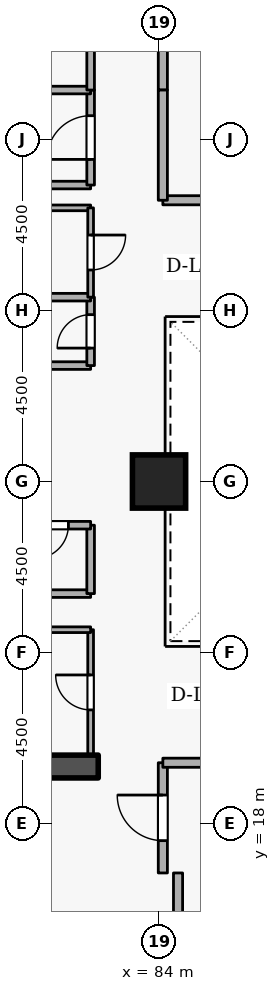
"""IFC4 building model, lengths in metres.
Left out: names, types, materials, properties, quantities, classifications, styles, units other than length and angle.
Written with IfcOpenShell. Run it as: python <this file> out.ifc"""

import sys

from ifc_helpers import new_model, si_unit, direction, frame, frame_2d, origin, origin_2d, place, context, subcontext, project, spatial, rectangle, extrude, element, fill, save


model = new_model("IFC4")
c1 = context("Model", 3, precision=1e-05, world=origin(), true_north=direction((0.0, 1.0)))
c2 = subcontext(c1, "Body", "Model", "MODEL_VIEW")
j1 = project(units=[si_unit("LENGTHUNIT", "METRE"), si_unit("PLANEANGLEUNIT", "RADIAN")], contexts=[c1])
p1 = place(None, origin())
s1 = spatial("IfcSite", under=j1, at=p1, CompositionType="ELEMENT")
p2 = place(p1, origin())
s2 = spatial("IfcBuilding", under=s1, at=p2, CompositionType="ELEMENT")
p3 = place(p2, frame((0.0, 0.0, 71.7)))
s3 = spatial("IfcBuildingStorey", under=s2, at=p3, CompositionType="ELEMENT", Elevation=71.7)
p4 = place(p3, frame((76.7, 19.5, 0.0), z_axis=(0.0, 0.0, 1.0), x_axis=(1.0, 0.0, 0.0)))
e1 = element("IfcWall", 1, at=p4, inside=s3, PredefinedType="SHEAR", context=c2, shape_type="SweptSolid", body=[
    extrude(rectangle(XDim=5.7, YDim=0.6, at=frame_2d((2.85, 0.0))), origin(), (0.0, 0.0, 1.0), 4.2),
])
p5 = place(p3, frame((84.0, 27.0, 0.0), z_axis=(0.0, 0.0, 1.0), x_axis=(1.0, 0.0, 0.0)))
e2 = element("IfcColumn", 2, at=p5, inside=s3, PredefinedType="COLUMN", context=c2, shape_type="SweptSolid", body=[
    extrude(rectangle(XDim=1.4, YDim=1.4, at=origin_2d()), origin(), (0.0, 0.0, 1.0), 4.2),
])
p6 = place(p3, frame((79.9, 34.8, 0.0), z_axis=(0.0, 0.0, 1.0), x_axis=(1.0, 0.0, 0.0)))
e3 = element("IfcWall", 3, at=p6, inside=s3, PredefinedType="STANDARD", context=c2, shape_type="SweptSolid", body=[
    extrude(rectangle(XDim=2.3, YDim=0.2, at=frame_2d((1.15, 0.0))), origin(), (0.0, 0.0, 1.0), 3.065),
])
p7 = place(p3, frame((82.2, 34.8, 0.0), z_axis=(0.0, 0.0, 1.0), x_axis=(0.0, 1.0, 0.0)))
e4 = element("IfcWall", 4, at=p7, inside=s3, PredefinedType="STANDARD", context=c2, shape_type="SweptSolid", body=[
    extrude(rectangle(XDim=2.5, YDim=0.2, at=frame_2d((1.25, 0.0))), origin(), (0.0, 0.0, 1.0), 3.86),
])
p8 = place(p7, frame((0.675, 0.0, 0.0)))
e5 = element("IfcOpeningElement", 5, at=p8, cuts=e4, PredefinedType="OPENING", context=c2, shape_type="SweptSolid", body=[
    extrude(rectangle(XDim=1.15, YDim=2.1, at=frame_2d((0.575, 1.05))), frame((0.0, 0.11, 0.0), z_axis=(0.0, -1.0, 0.0), x_axis=(1.0, 0.0, 0.0)), (0.0, 0.0, 1.0), 0.22),
])
p9 = place(p3, frame((82.2, 37.3, 0.0), z_axis=(0.0, 0.0, 1.0), x_axis=(-1.0, 0.0, 0.0)))
e6 = element("IfcWall", 6, at=p9, inside=s3, PredefinedType="STANDARD", context=c2, shape_type="SweptSolid", body=[
    extrude(rectangle(XDim=5.7, YDim=0.2, at=frame_2d((2.85, 0.0))), origin(), (0.0, 0.0, 1.0), 3.86),
])
p10 = place(p9, frame((2.275, 0.0, 0.0)))
e7 = element("IfcOpeningElement", 7, at=p10, cuts=e6, PredefinedType="OPENING", context=c2, shape_type="SweptSolid", body=[
    extrude(rectangle(XDim=1.15, YDim=2.1, at=frame_2d((0.575, 1.05))), frame((0.0, 0.11, 0.0), z_axis=(0.0, -1.0, 0.0), x_axis=(1.0, 0.0, 0.0)), (0.0, 0.0, 1.0), 0.22),
])
p11 = place(p3, frame((80.15, 24.05, 0.0), z_axis=(0.0, 0.0, 1.0), x_axis=(1.0, 0.0, 0.0)))
e8 = element("IfcWall", 8, at=p11, inside=s3, PredefinedType="STANDARD", context=c2, shape_type="SweptSolid", body=[
    extrude(rectangle(XDim=2.05, YDim=0.2, at=frame_2d((1.025, 0.0))), origin(), (0.0, 0.0, 1.0), 3.86),
])
p12 = place(p3, frame((82.2, 24.05, 0.0), z_axis=(0.0, 0.0, 1.0), x_axis=(0.0, 1.0, 0.0)))
e9 = element("IfcWall", 9, at=p12, inside=s3, PredefinedType="STANDARD", context=c2, shape_type="SweptSolid", body=[
    extrude(rectangle(XDim=1.8, YDim=0.2, at=frame_2d((0.9, 0.0))), origin(), (0.0, 0.0, 1.0), 3.86),
])
p13 = place(p3, frame((82.2, 25.85, 0.0), z_axis=(0.0, 0.0, 1.0), x_axis=(-1.0, 0.0, 0.0)))
e10 = element("IfcWall", 10, at=p13, inside=s3, PredefinedType="STANDARD", context=c2, shape_type="SweptSolid", body=[
    extrude(rectangle(XDim=2.05, YDim=0.2, at=frame_2d((1.025, 0.0))), origin(), (0.0, 0.0, 1.0), 3.86),
])
p14 = place(p13, frame((0.585, 0.0, 0.0)))
e11 = element("IfcOpeningElement", 11, at=p14, cuts=e10, PredefinedType="OPENING", context=c2, shape_type="SweptSolid", body=[
    extrude(rectangle(XDim=0.88, YDim=2.04, at=frame_2d((0.44, 1.02))), frame((0.0, 0.11, 0.0), z_axis=(0.0, -1.0, 0.0), x_axis=(1.0, 0.0, 0.0)), (0.0, 0.0, 1.0), 0.22),
])
p15 = place(p3, frame((80.15, 30.05, 0.0), z_axis=(0.0, 0.0, 1.0), x_axis=(1.0, 0.0, 0.0)))
e12 = element("IfcWall", 12, at=p15, inside=s3, PredefinedType="STANDARD", context=c2, shape_type="SweptSolid", body=[
    extrude(rectangle(XDim=2.05, YDim=0.2, at=frame_2d((1.025, 0.0))), origin(), (0.0, 0.0, 1.0), 3.86),
])
p16 = place(p3, frame((82.2, 30.05, 0.0), z_axis=(0.0, 0.0, 1.0), x_axis=(0.0, 1.0, 0.0)))
e13 = element("IfcWall", 13, at=p16, inside=s3, PredefinedType="STANDARD", context=c2, shape_type="SweptSolid", body=[
    extrude(rectangle(XDim=1.8, YDim=0.2, at=frame_2d((0.9, 0.0))), origin(), (0.0, 0.0, 1.0), 3.86),
])
p17 = place(p16, frame((0.46, 0.0, 0.0)))
e14 = element("IfcOpeningElement", 14, at=p17, cuts=e13, PredefinedType="OPENING", context=c2, shape_type="SweptSolid", body=[
    extrude(rectangle(XDim=0.88, YDim=2.04, at=frame_2d((0.44, 1.02))), frame((0.0, 0.11, 0.0), z_axis=(0.0, -1.0, 0.0), x_axis=(1.0, 0.0, 0.0)), (0.0, 0.0, 1.0), 0.22),
])
p18 = place(p3, frame((82.2, 31.85, 0.0), z_axis=(0.0, 0.0, 1.0), x_axis=(-1.0, 0.0, 0.0)))
e15 = element("IfcWall", 15, at=p18, inside=s3, PredefinedType="STANDARD", context=c2, shape_type="SweptSolid", body=[
    extrude(rectangle(XDim=2.05, YDim=0.2, at=frame_2d((1.025, 0.0))), origin(), (0.0, 0.0, 1.0), 3.86),
])
p19 = place(p3, frame((84.1, 37.3, 0.0), z_axis=(0.0, 0.0, 1.0), x_axis=(0.0, 1.0, 0.0)))
e16 = element("IfcWall", 16, at=p19, inside=s3, PredefinedType="STANDARD", context=c2, shape_type="SweptSolid", body=[
    extrude(rectangle(XDim=6.2, YDim=0.24, at=frame_2d((3.1, 0.0))), origin(), (0.0, 0.0, 1.0), 3.86),
])
p20 = place(p3, frame((88.5, 34.4, 0.0), z_axis=(0.0, 0.0, 1.0), x_axis=(-1.0, 0.0, 0.0)))
e17 = element("IfcWall", 17, at=p20, inside=s3, PredefinedType="STANDARD", context=c2, shape_type="SweptSolid", body=[
    extrude(rectangle(XDim=4.4, YDim=0.24, at=frame_2d((2.2, 0.0))), origin(), (0.0, 0.0, 1.0), 3.065),
])
p21 = place(p20, frame((1.6, 0.0, 0.0)))
e18 = element("IfcOpeningElement", 18, at=p21, cuts=e17, PredefinedType="OPENING", context=c2, shape_type="SweptSolid", body=[
    extrude(rectangle(XDim=1.2, YDim=2.1, at=frame_2d((0.6, 1.05))), frame((0.0, 0.13, 0.0), z_axis=(0.0, -1.0, 0.0), x_axis=(1.0, 0.0, 0.0)), (0.0, 0.0, 1.0), 0.26),
])
p22 = place(p3, frame((84.1, 34.4, 0.0), z_axis=(0.0, 0.0, 1.0), x_axis=(0.0, 1.0, 0.0)))
e19 = element("IfcWall", 19, at=p22, inside=s3, PredefinedType="STANDARD", context=c2, shape_type="SweptSolid", body=[
    extrude(rectangle(XDim=2.9, YDim=0.24, at=frame_2d((1.45, 0.0))), origin(), (0.0, 0.0, 1.0), 3.86),
])
p23 = place(p3, frame((82.2, 47.55, 0.0), z_axis=(0.0, 0.0, 1.0), x_axis=(0.0, -1.0, 0.0)))
e20 = element("IfcWall", 20, at=p23, inside=s3, PredefinedType="STANDARD", context=c2, shape_type="SweptSolid", body=[
    extrude(rectangle(XDim=10.25, YDim=0.2, at=frame_2d((5.125, 0.0))), origin(), (0.0, 0.0, 1.0), 3.86),
])
p24 = place(p3, frame((84.1, 16.7, 0.0), z_axis=(0.0, 0.0, 1.0), x_axis=(0.0, 1.0, 0.0)))
e21 = element("IfcWall", 21, at=p24, inside=s3, PredefinedType="STANDARD", context=c2, shape_type="SweptSolid", body=[
    extrude(rectangle(XDim=2.9, YDim=0.24, at=frame_2d((1.45, 0.0))), origin(), (0.0, 0.0, 1.0), 3.86),
])
p25 = place(p24, frame((0.85, 0.0, 0.0)))
e22 = element("IfcOpeningElement", 22, at=p25, cuts=e21, PredefinedType="OPENING", context=c2, shape_type="SweptSolid", body=[
    extrude(rectangle(XDim=1.2, YDim=2.1, at=frame_2d((0.6, 1.05))), frame((0.0, 0.13, 0.0), z_axis=(0.0, -1.0, 0.0), x_axis=(1.0, 0.0, 0.0)), (0.0, 0.0, 1.0), 0.26),
])
p26 = place(p3, frame((84.1, 19.6, 0.0), z_axis=(0.0, 0.0, 1.0), x_axis=(1.0, 0.0, 0.0)))
e23 = element("IfcWall", 23, at=p26, inside=s3, PredefinedType="STANDARD", context=c2, shape_type="SweptSolid", body=[
    extrude(rectangle(XDim=2.25, YDim=0.24, at=frame_2d((1.125, 0.0))), origin(), (0.0, 0.0, 1.0), 3.065),
])
p27 = place(p3, frame((84.5, 12.45, 0.0), z_axis=(0.0, 0.0, 1.0), x_axis=(0.0, 1.0, 0.0)))
e24 = element("IfcWall", 24, at=p27, inside=s3, PredefinedType="STANDARD", context=c2, shape_type="SweptSolid", body=[
    extrude(rectangle(XDim=4.25, YDim=0.24, at=frame_2d((2.125, 0.0))), origin(), (0.0, 0.0, 1.0), 3.86),
])
p28 = place(p3, frame((82.2, 19.8, 0.0), z_axis=(0.0, 0.0, 1.0), x_axis=(0.0, 1.0, 0.0)))
e25 = element("IfcWall", 25, at=p28, inside=s3, PredefinedType="PARTITIONING", context=c2, shape_type="SweptSolid", body=[
    extrude(rectangle(XDim=3.3, YDim=0.15, at=frame_2d((1.65, 0.0))), origin(), (0.0, 0.0, 1.0), 3.86),
])
p29 = place(p28, frame((1.19, 0.0, 0.0)))
e26 = element("IfcOpeningElement", 26, at=p29, cuts=e25, PredefinedType="OPENING", context=c2, shape_type="SweptSolid", body=[
    extrude(rectangle(XDim=0.92, YDim=2.08, at=frame_2d((0.46, 1.04))), frame((0.0, 0.085, 0.0), z_axis=(0.0, -1.0, 0.0), x_axis=(1.0, 0.0, 0.0)), (0.0, 0.0, 1.0), 0.17),
])
p30 = place(p3, frame((82.2, 23.1, 0.0), z_axis=(0.0, 0.0, 1.0), x_axis=(-1.0, 0.0, 0.0)))
e27 = element("IfcWall", 27, at=p30, inside=s3, PredefinedType="PARTITIONING", context=c2, shape_type="SweptSolid", body=[
    extrude(rectangle(XDim=2.05, YDim=0.15, at=frame_2d((1.025, 0.0))), origin(), (0.0, 0.0, 1.0), 3.86),
])
p31 = place(p3, frame((80.15, 34.2, 0.0), z_axis=(0.0, 0.0, 1.0), x_axis=(1.0, 0.0, 0.0)))
e28 = element("IfcWall", 28, at=p31, inside=s3, PredefinedType="PARTITIONING", context=c2, shape_type="SweptSolid", body=[
    extrude(rectangle(XDim=2.05, YDim=0.15, at=frame_2d((1.025, 0.0))), origin(), (0.0, 0.0, 1.0), 3.065),
])
p32 = place(p3, frame((82.2, 34.2, 0.0), z_axis=(0.0, 0.0, 1.0), x_axis=(0.0, -1.0, 0.0)))
e29 = element("IfcWall", 29, at=p32, inside=s3, PredefinedType="PARTITIONING", context=c2, shape_type="SweptSolid", body=[
    extrude(rectangle(XDim=2.35, YDim=0.15, at=frame_2d((1.175, 0.0))), origin(), (0.0, 0.0, 1.0), 3.86),
])
p33 = place(p32, frame((0.715, 0.0, 0.0)))
e30 = element("IfcOpeningElement", 30, at=p33, cuts=e29, PredefinedType="OPENING", context=c2, shape_type="SweptSolid", body=[
    extrude(rectangle(XDim=0.92, YDim=2.08, at=frame_2d((0.46, 1.04))), frame((0.0, 0.085, 0.0), z_axis=(0.0, -1.0, 0.0), x_axis=(1.0, 0.0, 0.0)), (0.0, 0.0, 1.0), 0.17),
])
p34 = place(p8, origin())
e31 = element("IfcDoor", 31, at=p34, inside=s3, OperationType="SINGLE_SWING_LEFT", PredefinedType="DOOR", context=c2, shape_type="SweptSolid", body=[
    extrude(rectangle(XDim=1.15, YDim=2.1, at=frame_2d((0.575, 1.05))), frame((0.0, 0.025, 0.0), z_axis=(0.0, -1.0, 0.0), x_axis=(1.0, 0.0, 0.0)), (0.0, 0.0, 1.0), 0.05),
])
fill(e5, e31)
p35 = place(p14, origin())
e32 = element("IfcDoor", 32, at=p35, inside=s3, OperationType="SINGLE_SWING_RIGHT", PredefinedType="DOOR", context=c2, shape_type="SweptSolid", body=[
    extrude(rectangle(XDim=0.88, YDim=2.04, at=frame_2d((0.44, 1.02))), frame((0.0, 0.025, 0.0), z_axis=(0.0, -1.0, 0.0), x_axis=(1.0, 0.0, 0.0)), (0.0, 0.0, 1.0), 0.05),
])
fill(e11, e32)
p36 = place(p17, origin())
e33 = element("IfcDoor", 33, at=p36, inside=s3, OperationType="SINGLE_SWING_LEFT", PredefinedType="DOOR", context=c2, shape_type="SweptSolid", body=[
    extrude(rectangle(XDim=0.88, YDim=2.04, at=frame_2d((0.44, 1.02))), frame((0.0, 0.025, 0.0), z_axis=(0.0, -1.0, 0.0), x_axis=(1.0, 0.0, 0.0)), (0.0, 0.0, 1.0), 0.05),
])
fill(e14, e33)
p37 = place(p29, origin())
e34 = element("IfcDoor", 34, at=p37, inside=s3, OperationType="SINGLE_SWING_RIGHT", PredefinedType="DOOR", context=c2, shape_type="SweptSolid", body=[
    extrude(rectangle(XDim=0.92, YDim=2.08, at=frame_2d((0.46, 1.04))), frame((0.0, 0.025, 0.0), z_axis=(0.0, -1.0, 0.0), x_axis=(1.0, 0.0, 0.0)), (0.0, 0.0, 1.0), 0.05),
])
fill(e26, e34)
p38 = place(p33, origin())
e35 = element("IfcDoor", 35, at=p38, inside=s3, OperationType="SINGLE_SWING_LEFT", PredefinedType="DOOR", context=c2, shape_type="SweptSolid", body=[
    extrude(rectangle(XDim=0.92, YDim=2.08, at=frame_2d((0.46, 1.04))), frame((0.0, 0.025, 0.0), z_axis=(0.0, -1.0, 0.0), x_axis=(1.0, 0.0, 0.0)), (0.0, 0.0, 1.0), 0.05),
])
fill(e30, e35)
p39 = place(p25, origin())
e36 = element("IfcDoor", 36, at=p39, inside=s3, OperationType="SINGLE_SWING_RIGHT", PredefinedType="DOOR", context=c2, shape_type="SweptSolid", body=[
    extrude(rectangle(XDim=1.2, YDim=2.1, at=frame_2d((0.6, 1.05))), frame((0.0, 0.025, 0.0), z_axis=(0.0, -1.0, 0.0), x_axis=(1.0, 0.0, 0.0)), (0.0, 0.0, 1.0), 0.05),
])
fill(e22, e36)
save(model, sys.argv[1])
